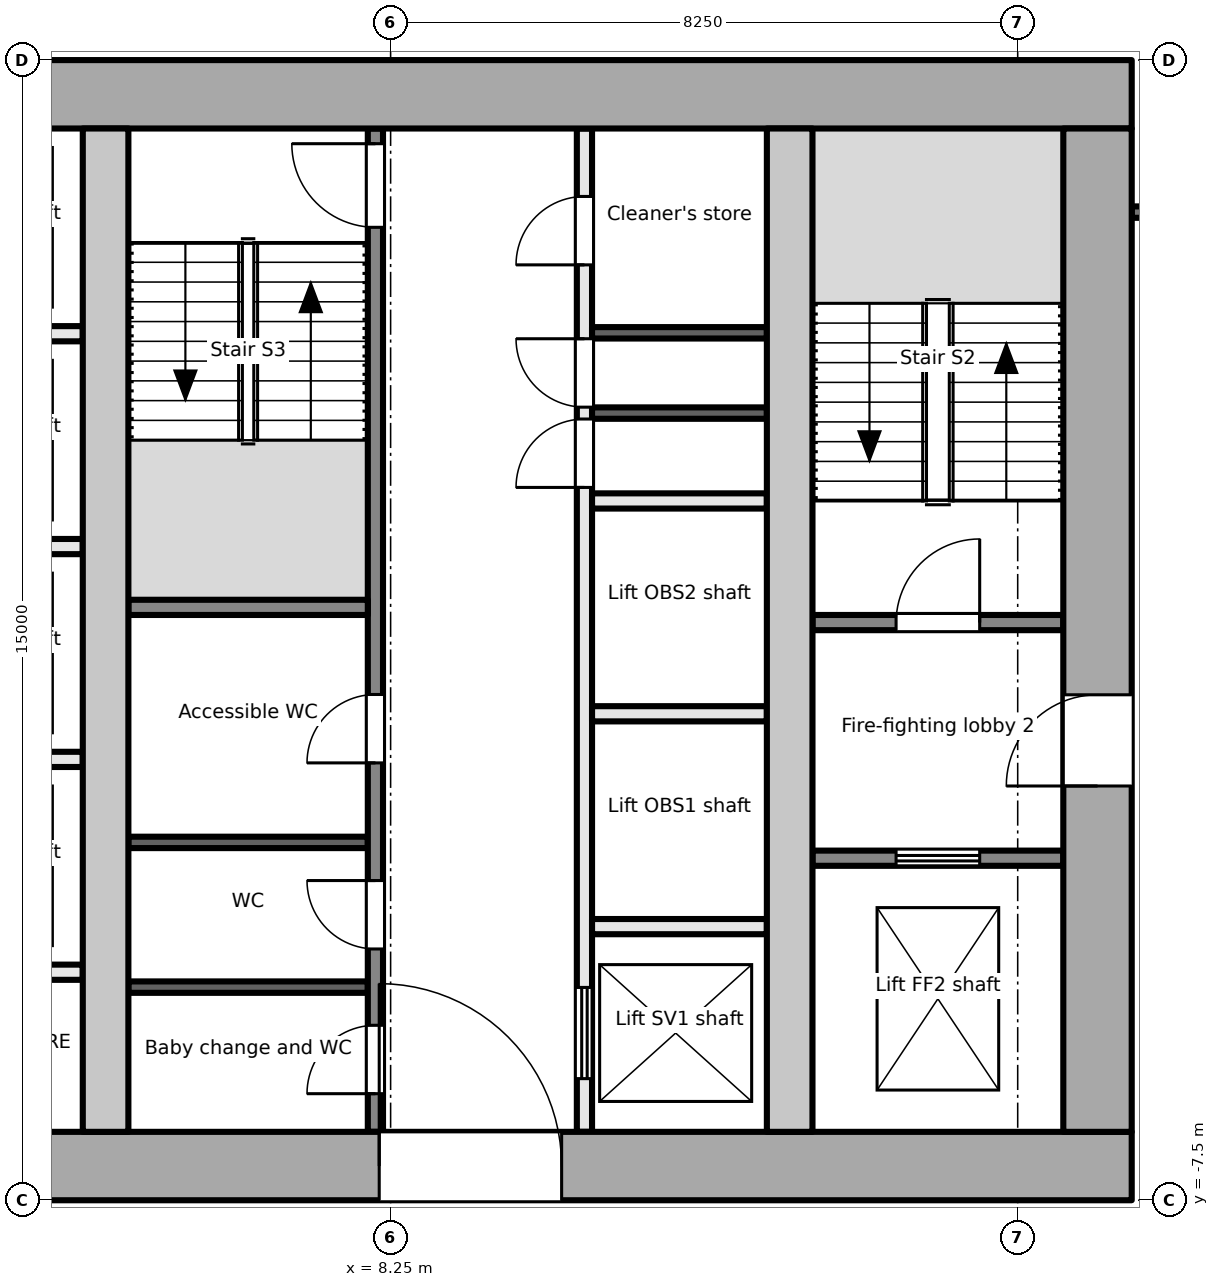
"""IFC4 building model, lengths in metres.
Left out: names, types, materials, properties, quantities, classifications, styles, units other than length and angle.
Written with IfcOpenShell. Run it as: python <this file> out.ifc"""

import sys

from ifc_helpers import new_model, si_unit, direction, frame, frame_2d, origin, place, context, subcontext, project, spatial, rectangle, extrude, element, fill, save


model = new_model("IFC4")
c1 = context("Model", 3, precision=1e-05, world=origin(), true_north=direction((0.0, 1.0)))
c2 = subcontext(c1, "Body", "Model", "MODEL_VIEW")
j1 = project(units=[si_unit("LENGTHUNIT", "METRE"), si_unit("PLANEANGLEUNIT", "RADIAN")], contexts=[c1])
p1 = place(None, origin())
s1 = spatial("IfcSite", under=j1, at=p1, CompositionType="ELEMENT")
p2 = place(p1, origin())
s2 = spatial("IfcBuilding", under=s1, at=p2, CompositionType="ELEMENT")
p3 = place(p2, frame((0.0, 0.0, 225.2)))
s3 = spatial("IfcBuildingStorey", under=s2, at=p3, CompositionType="ELEMENT", Elevation=225.2)
p4 = place(p3, frame((-18.0, -7.05, -0.2), z_axis=(0.0, 0.0, 1.0), x_axis=(1.0, 0.0, 0.0)))
e1 = element("IfcWall", 1, at=p4, inside=s3, PredefinedType="SHEAR", context=c2, shape_type="SweptSolid", body=[
    extrude(rectangle(XDim=36.0, YDim=0.9, at=frame_2d((18.0, 0.0))), origin(), (0.0, 0.0, 1.0), 3.9),
])
p5 = place(p4, frame((8.1, 0.0, 0.2)))
e2 = element("IfcOpeningElement", 2, at=p5, cuts=e1, PredefinedType="OPENING", context=c2, shape_type="SweptSolid", body=[
    extrude(rectangle(XDim=1.8, YDim=2.1, at=frame_2d((0.9, 1.05))), frame((0.0, 0.46, 0.0), z_axis=(0.0, -1.0, 0.0), x_axis=(1.0, 0.0, 0.0)), (0.0, 0.0, 1.0), 0.921),
])
p6 = place(p4, frame((16.8, 0.0, 0.2)))
e3 = element("IfcOpeningElement", 3, at=p6, cuts=e1, PredefinedType="OPENING", context=c2, shape_type="SweptSolid", body=[
    extrude(rectangle(XDim=2.4, YDim=2.1, at=frame_2d((1.2, 1.05))), frame((0.0, 0.46, 0.0), z_axis=(0.0, -1.0, 0.0), x_axis=(1.0, 0.0, 0.0)), (0.0, 0.0, 1.0), 0.921),
])
p7 = place(p4, frame((26.1, 0.0, 0.2)))
e4 = element("IfcOpeningElement", 4, at=p7, cuts=e1, PredefinedType="OPENING", context=c2, shape_type="SweptSolid", body=[
    extrude(rectangle(XDim=2.4, YDim=2.1, at=frame_2d((1.2, 1.05))), frame((0.0, 0.46, 0.0), z_axis=(0.0, -1.0, 0.0), x_axis=(1.0, 0.0, 0.0)), (0.0, 0.0, 1.0), 0.921),
])
p8 = place(p3, frame((-18.0, 7.05, -0.2), z_axis=(0.0, 0.0, 1.0), x_axis=(1.0, 0.0, 0.0)))
e5 = element("IfcWall", 5, at=p8, inside=s3, PredefinedType="SHEAR", context=c2, shape_type="SweptSolid", body=[
    extrude(rectangle(XDim=36.0, YDim=0.9, at=frame_2d((18.0, 0.0))), origin(), (0.0, 0.0, 1.0), 3.9),
])
p9 = place(p3, frame((17.55, -6.6, -0.2), z_axis=(0.0, 0.0, 1.0), x_axis=(0.0, 1.0, 0.0)))
e6 = element("IfcWall", 6, at=p9, inside=s3, PredefinedType="SHEAR", context=c2, shape_type="SweptSolid", body=[
    extrude(rectangle(XDim=13.2, YDim=0.9, at=frame_2d((6.6, 0.0))), origin(), (0.0, 0.0, 1.0), 3.9),
])
p10 = place(p9, frame((4.55, 0.0, 0.2)))
e7 = element("IfcOpeningElement", 7, at=p10, cuts=e6, PredefinedType="OPENING", context=c2, shape_type="SweptSolid", body=[
    extrude(rectangle(XDim=1.2, YDim=2.1, at=frame_2d((0.6, 1.05))), frame((0.0, 0.46, 0.0), z_axis=(0.0, -1.0, 0.0), x_axis=(1.0, 0.0, 0.0)), (0.0, 0.0, 1.0), 0.921),
])
for number, where, z_axis, x_axis in (
    (8, (4.5, -6.6, -0.2), (0.0, 0.0, 1.0), (0.0, 1.0, 0.0)),
    (9, (13.5, -6.6, -0.2), (0.0, 0.0, 1.0), (0.0, 1.0, 0.0)),
):
    element("IfcWall", number, at=place(p3, frame(where, z_axis=z_axis, x_axis=x_axis)), inside=s3, PredefinedType="SHEAR", context=c2, shape_type="SweptSolid", body=[
        extrude(rectangle(XDim=13.2, YDim=0.6, at=frame_2d((6.6, 0.0))), origin(), (0.0, 0.0, 1.0), 3.9),
    ])
p11 = place(p3, frame((13.8, -3.0, 0.0), z_axis=(0.0, 0.0, 1.0), x_axis=(1.0, 0.0, 0.0)))
e10 = element("IfcWall", 10, at=p11, inside=s3, PredefinedType="PARTITIONING", context=c2, shape_type="SweptSolid", body=[
    extrude(rectangle(XDim=3.3, YDim=0.2, at=frame_2d((1.65, 0.0))), origin(), (0.0, 0.0, 1.0), 3.7),
])
p12 = place(p11, frame((1.1, 0.0, 0.0)))
e11 = element("IfcOpeningElement", 11, at=p12, cuts=e10, PredefinedType="OPENING", context=c2, shape_type="SweptSolid", body=[
    extrude(rectangle(XDim=1.1, YDim=2.1, at=frame_2d((0.55, 1.05))), frame((0.0, 0.111, 0.0), z_axis=(0.0, -1.0, 0.0), x_axis=(1.0, 0.0, 0.0)), (0.0, 0.0, 1.0), 0.221),
])
p13 = place(p3, frame((13.8, 0.1, 0.0), z_axis=(0.0, 0.0, 1.0), x_axis=(1.0, 0.0, 0.0)))
e12 = element("IfcWall", 12, at=p13, inside=s3, PredefinedType="PARTITIONING", context=c2, shape_type="SweptSolid", body=[
    extrude(rectangle(XDim=3.3, YDim=0.2, at=frame_2d((1.65, 0.0))), origin(), (0.0, 0.0, 1.0), 3.7),
])
p14 = place(p13, frame((1.1, 0.0, 0.0)))
e13 = element("IfcOpeningElement", 13, at=p14, cuts=e12, PredefinedType="OPENING", context=c2, shape_type="SweptSolid", body=[
    extrude(rectangle(XDim=1.1, YDim=2.1, at=frame_2d((0.55, 1.05))), frame((0.0, 0.111, 0.0), z_axis=(0.0, -1.0, 0.0), x_axis=(1.0, 0.0, 0.0)), (0.0, 0.0, 1.0), 0.221),
])
for number, where, z_axis, x_axis in (
    (14, (1.9, -1.7, 0.0), (0.0, 0.0, 1.0), (1.0, 0.0, 0.0)),
    (15, (1.9, 1.1, 0.0), (0.0, 0.0, 1.0), (1.0, 0.0, 0.0)),
    (16, (1.9, 3.9, 0.0), (0.0, 0.0, 1.0), (1.0, 0.0, 0.0)),
    (17, (1.9, -4.5, 0.0), (0.0, 0.0, 1.0), (1.0, 0.0, 0.0)),
):
    element("IfcWall", number, at=place(p3, frame(where, z_axis=z_axis, x_axis=x_axis)), inside=s3, PredefinedType="PARTITIONING", context=c2, shape_type="SweptSolid", body=[
        extrude(rectangle(XDim=2.3, YDim=0.2, at=frame_2d((1.15, 0.0))), origin(), (0.0, 0.0, 1.0), 3.7),
    ])
p15 = place(p3, frame((8.05, -6.6, 0.0), z_axis=(0.0, 0.0, 1.0), x_axis=(0.0, 1.0, 0.0)))
e18 = element("IfcWall", 18, at=p15, inside=s3, PredefinedType="PARTITIONING", context=c2, shape_type="SweptSolid", body=[
    extrude(rectangle(XDim=13.2, YDim=0.2, at=frame_2d((6.6, 0.0))), origin(), (0.0, 0.0, 1.0), 3.7),
])
p16 = place(p15, frame((0.502, 0.0, 0.0)))
e19 = element("IfcOpeningElement", 19, at=p16, cuts=e18, PredefinedType="OPENING", context=c2, shape_type="SweptSolid", body=[
    extrude(rectangle(XDim=0.9, YDim=2.1, at=frame_2d((0.45, 1.05))), frame((0.0, 0.111, 0.0), z_axis=(0.0, -1.0, 0.0), x_axis=(1.0, 0.0, 0.0)), (0.0, 0.0, 1.0), 0.221),
])
p17 = place(p15, frame((2.406, 0.0, 0.0)))
e20 = element("IfcOpeningElement", 20, at=p17, cuts=e18, PredefinedType="OPENING", context=c2, shape_type="SweptSolid", body=[
    extrude(rectangle(XDim=0.9, YDim=2.1, at=frame_2d((0.45, 1.05))), frame((0.0, 0.111, 0.0), z_axis=(0.0, -1.0, 0.0), x_axis=(1.0, 0.0, 0.0)), (0.0, 0.0, 1.0), 0.221),
])
p18 = place(p15, frame((4.854, 0.0, 0.0)))
e21 = element("IfcOpeningElement", 21, at=p18, cuts=e18, PredefinedType="OPENING", context=c2, shape_type="SweptSolid", body=[
    extrude(rectangle(XDim=0.9, YDim=2.1, at=frame_2d((0.45, 1.05))), frame((0.0, 0.111, 0.0), z_axis=(0.0, -1.0, 0.0), x_axis=(1.0, 0.0, 0.0)), (0.0, 0.0, 1.0), 0.221),
])
p19 = place(p15, frame((11.9, 0.0, 0.0)))
e22 = element("IfcOpeningElement", 22, at=p19, cuts=e18, PredefinedType="OPENING", context=c2, shape_type="SweptSolid", body=[
    extrude(rectangle(XDim=1.1, YDim=2.1, at=frame_2d((0.55, 1.05))), frame((0.0, 0.111, 0.0), z_axis=(0.0, -1.0, 0.0), x_axis=(1.0, 0.0, 0.0)), (0.0, 0.0, 1.0), 0.221),
])
p20 = place(p3, frame((10.8, -6.6, 0.0), z_axis=(0.0, 0.0, 1.0), x_axis=(0.0, 1.0, 0.0)))
e23 = element("IfcWall", 23, at=p20, inside=s3, PredefinedType="PARTITIONING", context=c2, shape_type="SweptSolid", body=[
    extrude(rectangle(XDim=13.2, YDim=0.2, at=frame_2d((6.6, 0.0))), origin(), (0.0, 0.0, 1.0), 3.7),
])
p21 = place(p20, frame((0.7, 0.0, 0.0)))
e24 = element("IfcOpeningElement", 24, at=p21, cuts=e23, PredefinedType="OPENING", context=c2, shape_type="SweptSolid", body=[
    extrude(rectangle(XDim=1.2, YDim=2.1, at=frame_2d((0.6, 1.05))), frame((0.0, 0.111, 0.0), z_axis=(0.0, -1.0, 0.0), x_axis=(1.0, 0.0, 0.0)), (0.0, 0.0, 1.0), 0.221),
])
p22 = place(p20, frame((8.478, 0.0, 0.0)))
e25 = element("IfcOpeningElement", 25, at=p22, cuts=e23, PredefinedType="OPENING", context=c2, shape_type="SweptSolid", body=[
    extrude(rectangle(XDim=0.9, YDim=2.1, at=frame_2d((0.45, 1.05))), frame((0.0, 0.111, 0.0), z_axis=(0.0, -1.0, 0.0), x_axis=(1.0, 0.0, 0.0)), (0.0, 0.0, 1.0), 0.221),
])
p23 = place(p20, frame((9.534, 0.0, 0.0)))
e26 = element("IfcOpeningElement", 26, at=p23, cuts=e23, PredefinedType="OPENING", context=c2, shape_type="SweptSolid", body=[
    extrude(rectangle(XDim=0.9, YDim=2.1, at=frame_2d((0.45, 1.05))), frame((0.0, 0.111, 0.0), z_axis=(0.0, -1.0, 0.0), x_axis=(1.0, 0.0, 0.0)), (0.0, 0.0, 1.0), 0.221),
])
p24 = place(p20, frame((11.406, 0.0, 0.0)))
e27 = element("IfcOpeningElement", 27, at=p24, cuts=e23, PredefinedType="OPENING", context=c2, shape_type="SweptSolid", body=[
    extrude(rectangle(XDim=0.9, YDim=2.1, at=frame_2d((0.45, 1.05))), frame((0.0, 0.111, 0.0), z_axis=(0.0, -1.0, 0.0), x_axis=(1.0, 0.0, 0.0)), (0.0, 0.0, 1.0), 0.221),
])
p25 = place(p3, frame((4.8, 0.3, 0.0), z_axis=(0.0, 0.0, 1.0), x_axis=(1.0, 0.0, 0.0)))
e28 = element("IfcWall", 28, at=p25, inside=s3, PredefinedType="PARTITIONING", context=c2, shape_type="SweptSolid", body=[
    extrude(rectangle(XDim=3.15, YDim=0.2, at=frame_2d((1.575, 0.0))), origin(), (0.0, 0.0, 1.0), 3.7),
])
for number, where, z_axis, x_axis in (
    (29, (4.8, -4.696, 0.0), (0.0, 0.0, 1.0), (1.0, 0.0, 0.0)),
    (30, (4.8, -2.792, 0.0), (0.0, 0.0, 1.0), (1.0, 0.0, 0.0)),
):
    element("IfcWall", number, at=place(p3, frame(where, z_axis=z_axis, x_axis=x_axis)), inside=s3, PredefinedType="PARTITIONING", context=c2, shape_type="SweptSolid", body=[
        extrude(rectangle(XDim=3.15, YDim=0.15, at=frame_2d((1.575, 0.0))), origin(), (0.0, 0.0, 1.0), 3.7),
    ])
for number, where, z_axis, x_axis in (
    (31, (10.9, -3.9, 0.0), (0.0, 0.0, 1.0), (1.0, 0.0, 0.0)),
    (32, (10.9, -1.1, 0.0), (0.0, 0.0, 1.0), (1.0, 0.0, 0.0)),
    (33, (10.9, 1.7, 0.0), (0.0, 0.0, 1.0), (1.0, 0.0, 0.0)),
):
    element("IfcWall", number, at=place(p3, frame(where, z_axis=z_axis, x_axis=x_axis)), inside=s3, PredefinedType="PARTITIONING", context=c2, shape_type="SweptSolid", body=[
        extrude(rectangle(XDim=2.3, YDim=0.2, at=frame_2d((1.15, 0.0))), origin(), (0.0, 0.0, 1.0), 3.7),
    ])
for number, where, z_axis, x_axis in (
    (34, (10.9, 2.856, 0.0), (0.0, 0.0, 1.0), (1.0, 0.0, 0.0)),
    (35, (10.9, 3.912, 0.0), (0.0, 0.0, 1.0), (1.0, 0.0, 0.0)),
):
    element("IfcWall", number, at=place(p3, frame(where, z_axis=z_axis, x_axis=x_axis)), inside=s3, PredefinedType="PARTITIONING", context=c2, shape_type="SweptSolid", body=[
        extrude(rectangle(XDim=2.3, YDim=0.15, at=frame_2d((1.15, 0.0))), origin(), (0.0, 0.0, 1.0), 3.7),
    ])
p26 = place(p3, frame((18.0, 5.5, 0.0), z_axis=(0.0, 0.0, 1.0), x_axis=(1.0, 0.0, 0.0)))
e36 = element("IfcWall", 36, at=p26, inside=s3, PredefinedType="PARTITIONING", context=c2, shape_type="SweptSolid", body=[
    extrude(rectangle(XDim=2.7, YDim=0.15, at=frame_2d((1.35, 0.0))), origin(), (0.0, 0.0, 1.0), 3.7),
])
p27 = place(p26, frame((0.55, 0.0, 0.0)))
e37 = element("IfcOpeningElement", 37, at=p27, cuts=e36, PredefinedType="OPENING", context=c2, shape_type="SweptSolid", body=[
    extrude(rectangle(XDim=1.8, YDim=2.1, at=frame_2d((0.9, 1.05))), frame((0.0, 0.085, 0.0), z_axis=(0.0, -1.0, 0.0), x_axis=(1.0, 0.0, 0.0)), (0.0, 0.0, 1.0), 0.171),
])
p28 = place(p12, origin())
e38 = element("IfcDoor", 38, at=p28, inside=s3, OperationType="DOUBLE_DOOR_SLIDING", PredefinedType="DOOR", context=c2, shape_type="SweptSolid", body=[
    extrude(rectangle(XDim=1.1, YDim=2.1, at=frame_2d((0.55, 1.05))), frame((0.0, 0.025, 0.0), z_axis=(0.0, -1.0, 0.0), x_axis=(1.0, 0.0, 0.0)), (0.0, 0.0, 1.0), 0.05),
])
fill(e11, e38)
p29 = place(p10, origin())
e39 = element("IfcDoor", 39, at=p29, inside=s3, OperationType="SINGLE_SWING_LEFT", PredefinedType="DOOR", context=c2, shape_type="SweptSolid", body=[
    extrude(rectangle(XDim=1.2, YDim=2.1, at=frame_2d((0.6, 1.05))), frame((0.0, 0.025, 0.0), z_axis=(0.0, -1.0, 0.0), x_axis=(1.0, 0.0, 0.0)), (0.0, 0.0, 1.0), 0.05),
])
fill(e7, e39)
p30 = place(p14, origin())
e40 = element("IfcDoor", 40, at=p30, inside=s3, OperationType="SINGLE_SWING_RIGHT", PredefinedType="DOOR", context=c2, shape_type="SweptSolid", body=[
    extrude(rectangle(XDim=1.1, YDim=2.1, at=frame_2d((0.55, 1.05))), frame((0.0, 0.025, 0.0), z_axis=(0.0, -1.0, 0.0), x_axis=(1.0, 0.0, 0.0)), (0.0, 0.0, 1.0), 0.05),
])
fill(e13, e40)
p31 = place(p16, origin())
e41 = element("IfcDoor", 41, at=p31, inside=s3, OperationType="SINGLE_SWING_LEFT", PredefinedType="DOOR", context=c2, shape_type="SweptSolid", body=[
    extrude(rectangle(XDim=0.9, YDim=2.1, at=frame_2d((0.45, 1.05))), frame((0.0, 0.025, 0.0), z_axis=(0.0, -1.0, 0.0), x_axis=(1.0, 0.0, 0.0)), (0.0, 0.0, 1.0), 0.05),
])
fill(e19, e41)
p32 = place(p17, origin())
e42 = element("IfcDoor", 42, at=p32, inside=s3, OperationType="SINGLE_SWING_RIGHT", PredefinedType="DOOR", context=c2, shape_type="SweptSolid", body=[
    extrude(rectangle(XDim=0.9, YDim=2.1, at=frame_2d((0.45, 1.05))), frame((0.0, 0.025, 0.0), z_axis=(0.0, -1.0, 0.0), x_axis=(1.0, 0.0, 0.0)), (0.0, 0.0, 1.0), 0.05),
])
fill(e20, e42)
p33 = place(p18, origin())
e43 = element("IfcDoor", 43, at=p33, inside=s3, OperationType="SINGLE_SWING_LEFT", PredefinedType="DOOR", context=c2, shape_type="SweptSolid", body=[
    extrude(rectangle(XDim=0.9, YDim=2.1, at=frame_2d((0.45, 1.05))), frame((0.0, 0.025, 0.0), z_axis=(0.0, -1.0, 0.0), x_axis=(1.0, 0.0, 0.0)), (0.0, 0.0, 1.0), 0.05),
])
fill(e21, e43)
p34 = place(p19, origin())
e44 = element("IfcDoor", 44, at=p34, inside=s3, OperationType="SINGLE_SWING_RIGHT", PredefinedType="DOOR", context=c2, shape_type="SweptSolid", body=[
    extrude(rectangle(XDim=1.1, YDim=2.1, at=frame_2d((0.55, 1.05))), frame((0.0, 0.025, 0.0), z_axis=(0.0, -1.0, 0.0), x_axis=(1.0, 0.0, 0.0)), (0.0, 0.0, 1.0), 0.05),
])
fill(e22, e44)
p35 = place(p7, origin())
e45 = element("IfcDoor", 45, at=p35, inside=s3, OperationType="DOUBLE_DOOR_DOUBLE_SWING", PredefinedType="DOOR", context=c2, shape_type="SweptSolid", body=[
    extrude(rectangle(XDim=2.4, YDim=2.1, at=frame_2d((1.2, 1.05))), frame((0.0, 0.025, 0.0), z_axis=(0.0, -1.0, 0.0), x_axis=(1.0, 0.0, 0.0)), (0.0, 0.0, 1.0), 0.05),
])
fill(e4, e45)
p36 = place(p21, origin())
e46 = element("IfcDoor", 46, at=p36, inside=s3, OperationType="DOUBLE_DOOR_SLIDING", PredefinedType="DOOR", context=c2, shape_type="SweptSolid", body=[
    extrude(rectangle(XDim=1.2, YDim=2.1, at=frame_2d((0.6, 1.05))), frame((0.0, 0.025, 0.0), z_axis=(0.0, -1.0, 0.0), x_axis=(1.0, 0.0, 0.0)), (0.0, 0.0, 1.0), 0.05),
])
fill(e24, e46)
p37 = place(p22, origin())
e47 = element("IfcDoor", 47, at=p37, inside=s3, OperationType="SINGLE_SWING_LEFT", PredefinedType="DOOR", context=c2, shape_type="SweptSolid", body=[
    extrude(rectangle(XDim=0.9, YDim=2.1, at=frame_2d((0.45, 1.05))), frame((0.0, 0.025, 0.0), z_axis=(0.0, -1.0, 0.0), x_axis=(1.0, 0.0, 0.0)), (0.0, 0.0, 1.0), 0.05),
])
fill(e25, e47)
p38 = place(p23, origin())
e48 = element("IfcDoor", 48, at=p38, inside=s3, OperationType="SINGLE_SWING_RIGHT", PredefinedType="DOOR", context=c2, shape_type="SweptSolid", body=[
    extrude(rectangle(XDim=0.9, YDim=2.1, at=frame_2d((0.45, 1.05))), frame((0.0, 0.025, 0.0), z_axis=(0.0, -1.0, 0.0), x_axis=(1.0, 0.0, 0.0)), (0.0, 0.0, 1.0), 0.05),
])
fill(e26, e48)
p39 = place(p24, origin())
e49 = element("IfcDoor", 49, at=p39, inside=s3, OperationType="SINGLE_SWING_LEFT", PredefinedType="DOOR", context=c2, shape_type="SweptSolid", body=[
    extrude(rectangle(XDim=0.9, YDim=2.1, at=frame_2d((0.45, 1.05))), frame((0.0, 0.025, 0.0), z_axis=(0.0, -1.0, 0.0), x_axis=(1.0, 0.0, 0.0)), (0.0, 0.0, 1.0), 0.05),
])
fill(e27, e49)
save(model, sys.argv[1])
